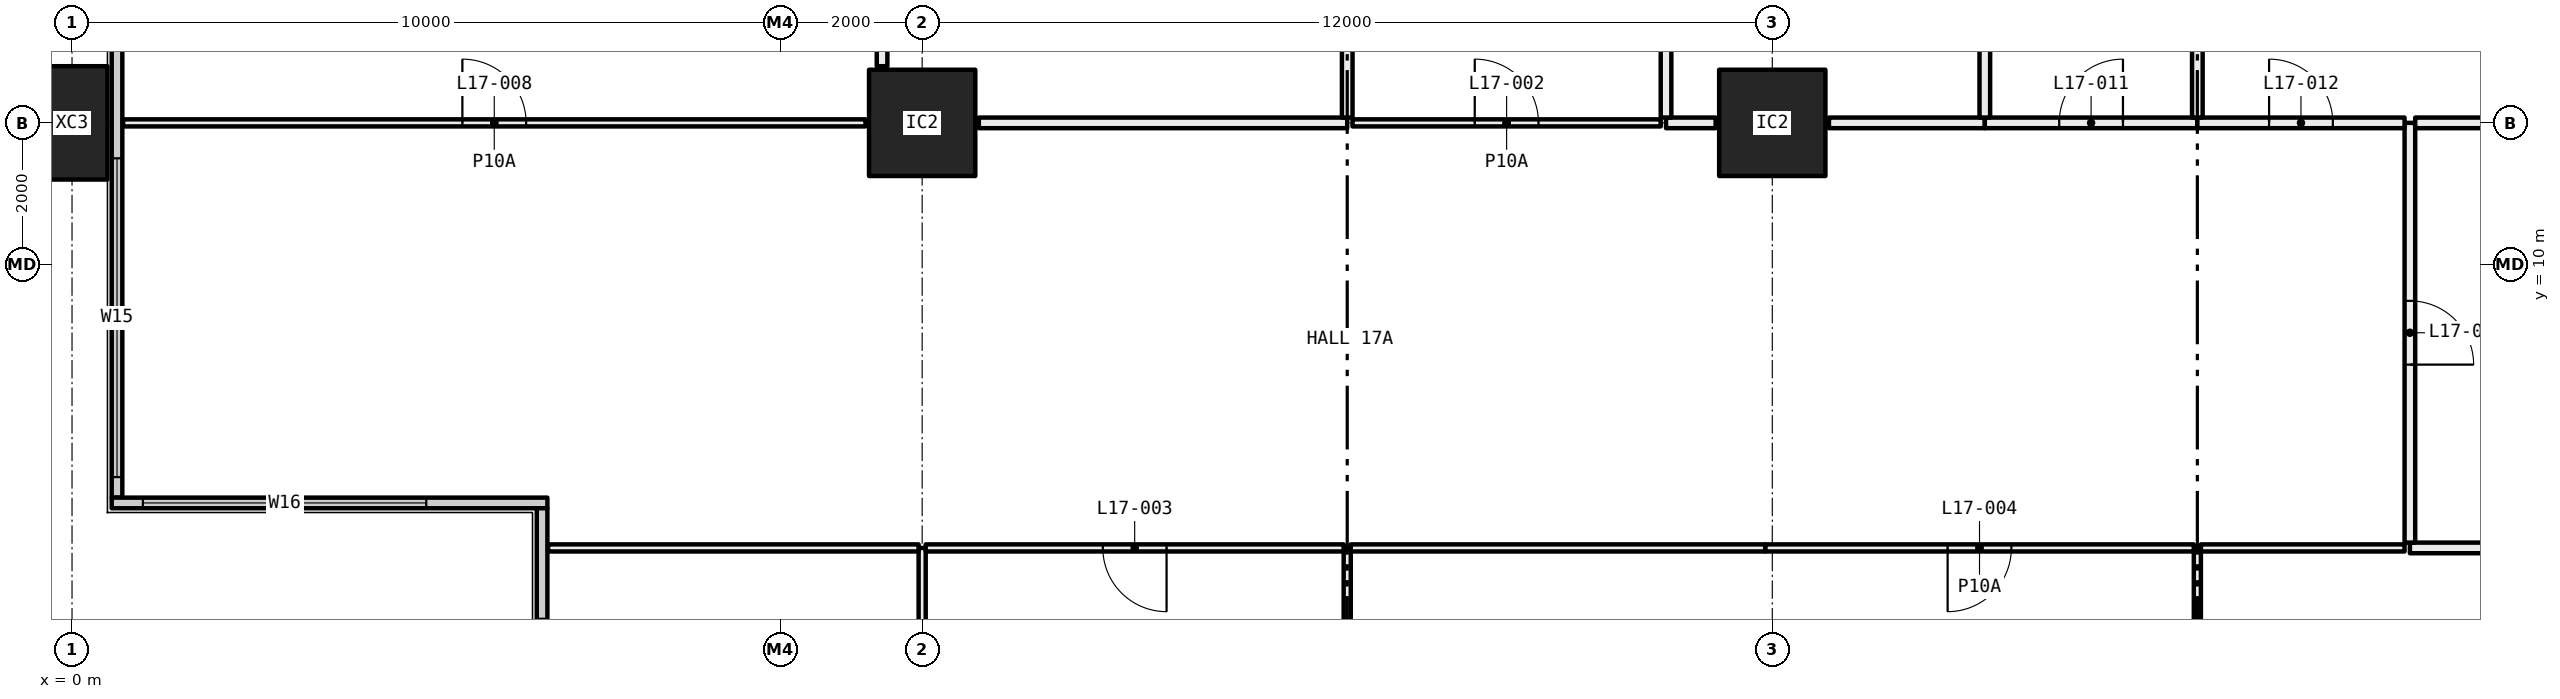
"""IFC4 building model, lengths in metres.
Left out: names, types, materials, properties, quantities, classifications, styles, units other than length and angle.
Written with IfcOpenShell. Run it as: python <this file> out.ifc"""

import sys

from ifc_helpers import new_model, si_unit, direction, frame, frame_2d, origin, origin_2d, place, context, subcontext, project, spatial, rectangle, hollow_rectangle, extrude, element, fill, save


model = new_model("IFC4")
c1 = context("Model", 3, precision=1e-05, world=origin(), true_north=direction((0.0, 1.0)))
c2 = subcontext(c1, "Body", "Model", "MODEL_VIEW")
j1 = project(units=[si_unit("LENGTHUNIT", "METRE"), si_unit("PLANEANGLEUNIT", "RADIAN")], contexts=[c1])
p1 = place(None, origin())
s1 = spatial("IfcSite", under=j1, at=p1, CompositionType="ELEMENT")
p2 = place(p1, origin())
s2 = spatial("IfcBuilding", under=s1, at=p2, CompositionType="ELEMENT")
p3 = place(p2, frame((0.0, 0.0, 71.4)))
s3 = spatial("IfcBuildingStorey", under=s2, at=p3, CompositionType="ELEMENT", Elevation=71.4)
p4 = place(p3, frame((0.0, 12.0, -0.4), z_axis=(0.0, 0.0, 1.0), x_axis=(0.0, 1.0, 0.0)))
e1 = element("IfcColumn", 1, at=p4, inside=s3, PredefinedType="COLUMN", context=c2, shape_type="SweptSolid", body=[
    extrude(hollow_rectangle(XDim=1.6, YDim=1.0, WallThickness=0.065, at=origin_2d()), origin(), (0.0, 0.0, 1.0), 3.45),
])
for number, where, z_axis, x_axis in (
    (2, (12.0, 12.0, 0.0), (0.0, 0.0, 1.0), (1.0, 0.0, 0.0)),
    (3, (24.0, 12.0, 0.0), (0.0, 0.0, 1.0), (1.0, 0.0, 0.0)),
):
    element("IfcColumn", number, at=place(p3, frame(where, z_axis=z_axis, x_axis=x_axis)), inside=s3, PredefinedType="COLUMN", context=c2, shape_type="SweptSolid", body=[
        extrude(hollow_rectangle(XDim=1.5, YDim=1.5, WallThickness=0.065, at=origin_2d()), origin(), (0.0, 0.0, 1.0), 3.05),
    ])
p5 = place(p3, frame((0.635, 6.71, 0.0), z_axis=(0.0, 0.0, 1.0), x_axis=(0.0, 1.0, 0.0)))
e4 = element("IfcWall", 4, at=p5, inside=s3, PredefinedType="ELEMENTEDWALL", context=c2, shape_type="SweptSolid", body=[
    extrude(rectangle(XDim=34.58, YDim=0.15, at=frame_2d((17.29, 0.0))), origin(), (0.0, 0.0, 1.0), 3.05),
])
p6 = place(p5, frame((0.29, 0.0, 0.45)))
e5 = element("IfcOpeningElement", 5, at=p6, cuts=e4, PredefinedType="OPENING", context=c2, shape_type="SweptSolid", body=[
    extrude(rectangle(XDim=4.5, YDim=2.55, at=frame_2d((2.25, 1.275))), frame((0.0, 0.085, 0.0), z_axis=(0.0, -1.0, 0.0), x_axis=(1.0, 0.0, 0.0)), (0.0, 0.0, 1.0), 0.17),
])
p7 = place(p5, frame((7.79, 0.0, 0.45)))
e6 = element("IfcOpeningElement", 6, at=p7, cuts=e4, PredefinedType="OPENING", context=c2, shape_type="SweptSolid", body=[
    extrude(rectangle(XDim=3.0, YDim=2.55, at=frame_2d((1.5, 1.275))), frame((0.0, 0.085, 0.0), z_axis=(0.0, -1.0, 0.0), x_axis=(1.0, 0.0, 0.0)), (0.0, 0.0, 1.0), 0.17),
])
p8 = place(p5, frame((11.79, 0.0, 0.45)))
e7 = element("IfcOpeningElement", 7, at=p8, cuts=e4, PredefinedType="OPENING", context=c2, shape_type="SweptSolid", body=[
    extrude(rectangle(XDim=3.0, YDim=2.55, at=frame_2d((1.5, 1.275))), frame((0.0, 0.085, 0.0), z_axis=(0.0, -1.0, 0.0), x_axis=(1.0, 0.0, 0.0)), (0.0, 0.0, 1.0), 0.17),
])
p9 = place(p5, frame((19.79, 0.0, 0.45)))
e8 = element("IfcOpeningElement", 8, at=p9, cuts=e4, PredefinedType="OPENING", context=c2, shape_type="SweptSolid", body=[
    extrude(rectangle(XDim=3.0, YDim=2.55, at=frame_2d((1.5, 1.275))), frame((0.0, 0.085, 0.0), z_axis=(0.0, -1.0, 0.0), x_axis=(1.0, 0.0, 0.0)), (0.0, 0.0, 1.0), 0.17),
])
p10 = place(p5, frame((23.79, 0.0, 0.45)))
e9 = element("IfcOpeningElement", 9, at=p10, cuts=e4, PredefinedType="OPENING", context=c2, shape_type="SweptSolid", body=[
    extrude(rectangle(XDim=2.0, YDim=2.55, at=frame_2d((1.0, 1.275))), frame((0.0, 0.085, 0.0), z_axis=(0.0, -1.0, 0.0), x_axis=(1.0, 0.0, 0.0)), (0.0, 0.0, 1.0), 0.17),
])
p11 = place(p5, frame((29.79, 0.0, 0.45)))
e10 = element("IfcOpeningElement", 10, at=p11, cuts=e4, PredefinedType="OPENING", context=c2, shape_type="SweptSolid", body=[
    extrude(rectangle(XDim=4.5, YDim=2.55, at=frame_2d((2.25, 1.275))), frame((0.0, 0.085, 0.0), z_axis=(0.0, -1.0, 0.0), x_axis=(1.0, 0.0, 0.0)), (0.0, 0.0, 1.0), 0.17),
])
p12 = place(p3, frame((0.56, 6.635, 0.0), z_axis=(0.0, 0.0, 1.0), x_axis=(1.0, 0.0, 0.0)))
e11 = element("IfcWall", 11, at=p12, inside=s3, PredefinedType="ELEMENTEDWALL", context=c2, shape_type="SweptSolid", body=[
    extrude(rectangle(XDim=6.15, YDim=0.15, at=frame_2d((3.075, 0.0))), origin(), (0.0, 0.0, 1.0), 3.05),
])
p13 = place(p12, frame((0.44, 0.0, 0.45)))
e12 = element("IfcOpeningElement", 12, at=p13, cuts=e11, PredefinedType="OPENING", context=c2, shape_type="SweptSolid", body=[
    extrude(rectangle(XDim=4.0, YDim=2.55, at=frame_2d((2.0, 1.275))), frame((0.0, 0.085, 0.0), z_axis=(0.0, -1.0, 0.0), x_axis=(1.0, 0.0, 0.0)), (0.0, 0.0, 1.0), 0.17),
])
p14 = place(p3, frame((6.635, 0.71, 0.0), z_axis=(0.0, 0.0, 1.0), x_axis=(0.0, 1.0, 0.0)))
e13 = element("IfcWall", 13, at=p14, inside=s3, PredefinedType="ELEMENTEDWALL", context=c2, shape_type="SweptSolid", body=[
    extrude(rectangle(XDim=5.85, YDim=0.15, at=frame_2d((2.925, 0.0))), origin(), (0.0, 0.0, 1.0), 3.05),
])
p15 = place(p14, frame((0.29, 0.0, 0.45)))
e14 = element("IfcOpeningElement", 14, at=p15, cuts=e13, PredefinedType="OPENING", context=c2, shape_type="SweptSolid", body=[
    extrude(rectangle(XDim=4.0, YDim=2.55, at=frame_2d((2.0, 1.275))), frame((0.0, 0.085, 0.0), z_axis=(0.0, -1.0, 0.0), x_axis=(1.0, 0.0, 0.0)), (0.0, 0.0, 1.0), 0.17),
])
p16 = place(p3, frame((12.0, 0.72, 0.0), z_axis=(0.0, 0.0, 1.0), x_axis=(0.0, 1.0, 0.0)))
e15 = element("IfcWall", 15, at=p16, inside=s3, PredefinedType="PARTITIONING", context=c2, shape_type="SweptSolid", body=[
    extrude(rectangle(XDim=5.28, YDim=0.1, at=frame_2d((2.64, 0.0))), origin(), (0.0, 0.0, 1.0), 2.45),
])
p17 = place(p16, frame((2.19, 0.0, 0.0)))
e16 = element("IfcOpeningElement", 16, at=p17, cuts=e15, PredefinedType="OPENING", context=c2, shape_type="SweptSolid", body=[
    extrude(rectangle(XDim=0.9, YDim=2.1, at=frame_2d((0.45, 1.05))), frame((0.0, 0.06, 0.0), z_axis=(0.0, -1.0, 0.0), x_axis=(1.0, 0.0, 0.0)), (0.0, 0.0, 1.0), 0.12),
])
p18 = place(p3, frame((11.95, 6.0, 0.0), z_axis=(0.0, 0.0, 1.0), x_axis=(-1.0, 0.0, 0.0)))
e17 = element("IfcWall", 17, at=p18, inside=s3, PredefinedType="PARTITIONING", context=c2, shape_type="SweptSolid", body=[
    extrude(rectangle(XDim=5.23, YDim=0.1, at=frame_2d((2.615, 0.0))), origin(), (0.0, 0.0, 1.0), 2.45),
])
p19 = place(p3, frame((18.0, 0.72, 0.0), z_axis=(0.0, 0.0, 1.0), x_axis=(0.0, 1.0, 0.0)))
e18 = element("IfcWall", 18, at=p19, inside=s3, PredefinedType="PARTITIONING", context=c2, shape_type="SweptSolid", body=[
    extrude(rectangle(XDim=5.28, YDim=0.1, at=frame_2d((2.64, 0.0))), origin(), (0.0, 0.0, 1.0), 3.05),
])
p20 = place(p3, frame((17.95, 6.0, 0.0), z_axis=(0.0, 0.0, 1.0), x_axis=(-1.0, 0.0, 0.0)))
e19 = element("IfcWall", 19, at=p20, inside=s3, PredefinedType="PARTITIONING", context=c2, shape_type="SweptSolid", body=[
    extrude(rectangle(XDim=5.9, YDim=0.1, at=frame_2d((2.95, 0.0))), origin(), (0.0, 0.0, 1.0), 2.45),
])
p21 = place(p20, frame((2.5, 0.0, 0.0)))
e20 = element("IfcOpeningElement", 20, at=p21, cuts=e19, PredefinedType="OPENING", context=c2, shape_type="SweptSolid", body=[
    extrude(rectangle(XDim=0.9, YDim=2.1, at=frame_2d((0.45, 1.05))), frame((0.0, 0.06, 0.0), z_axis=(0.0, -1.0, 0.0), x_axis=(1.0, 0.0, 0.0)), (0.0, 0.0, 1.0), 0.12),
])
p22 = place(p3, frame((30.0, 0.72, 0.0), z_axis=(0.0, 0.0, 1.0), x_axis=(0.0, 1.0, 0.0)))
e21 = element("IfcWall", 21, at=p22, inside=s3, PredefinedType="PARTITIONING", context=c2, shape_type="SweptSolid", body=[
    extrude(rectangle(XDim=5.28, YDim=0.1, at=frame_2d((2.64, 0.0))), origin(), (0.0, 0.0, 1.0), 3.05),
])
p23 = place(p22, frame((2.19, 0.0, 0.0)))
e22 = element("IfcOpeningElement", 22, at=p23, cuts=e21, PredefinedType="OPENING", context=c2, shape_type="SweptSolid", body=[
    extrude(rectangle(XDim=0.9, YDim=2.1, at=frame_2d((0.45, 1.05))), frame((0.0, 0.06, 0.0), z_axis=(0.0, -1.0, 0.0), x_axis=(1.0, 0.0, 0.0)), (0.0, 0.0, 1.0), 0.12),
])
p24 = place(p3, frame((29.95, 6.0, 0.0), z_axis=(0.0, 0.0, 1.0), x_axis=(-1.0, 0.0, 0.0)))
e23 = element("IfcWall", 23, at=p24, inside=s3, PredefinedType="PARTITIONING", context=c2, shape_type="SweptSolid", body=[
    extrude(rectangle(XDim=6.05, YDim=0.1, at=frame_2d((3.025, 0.0))), origin(), (0.0, 0.0, 1.0), 2.45),
])
p25 = place(p24, frame((2.575, 0.0, 0.0)))
e24 = element("IfcOpeningElement", 24, at=p25, cuts=e23, PredefinedType="OPENING", context=c2, shape_type="SweptSolid", body=[
    extrude(rectangle(XDim=0.9, YDim=2.1, at=frame_2d((0.45, 1.05))), frame((0.0, 0.06, 0.0), z_axis=(0.0, -1.0, 0.0), x_axis=(1.0, 0.0, 0.0)), (0.0, 0.0, 1.0), 0.12),
])
p26 = place(p3, frame((23.9, 6.0, 0.0), z_axis=(0.0, 0.0, 1.0), x_axis=(-1.0, 0.0, 0.0)))
e25 = element("IfcWall", 25, at=p26, inside=s3, PredefinedType="PARTITIONING", context=c2, shape_type="SweptSolid", body=[
    extrude(rectangle(XDim=5.85, YDim=0.1, at=frame_2d((2.925, 0.0))), origin(), (0.0, 0.0, 1.0), 3.05),
])
p27 = place(p3, frame((32.925, 6.0, 0.0), z_axis=(0.0, 0.0, 1.0), x_axis=(-1.0, 0.0, 0.0)))
e26 = element("IfcWall", 26, at=p27, inside=s3, PredefinedType="PARTITIONING", context=c2, shape_type="SweptSolid", body=[
    extrude(rectangle(XDim=2.875, YDim=0.1, at=frame_2d((1.438, 0.0))), origin(), (0.0, 0.0, 1.0), 3.05),
])
p28 = place(p3, frame((35.9, 6.0, 0.0), z_axis=(0.0, 0.0, 1.0), x_axis=(-1.0, 0.0, 0.0)))
e27 = element("IfcWall", 27, at=p28, inside=s3, PredefinedType="PARTITIONING", context=c2, shape_type="SweptSolid", body=[
    extrude(rectangle(XDim=2.9, YDim=0.15, at=frame_2d((1.45, 0.0))), origin(), (0.0, 0.0, 1.0), 3.05),
])
p29 = place(p3, frame((33.0, 6.075, 0.0), z_axis=(0.0, 0.0, 1.0), x_axis=(0.0, 1.0, 0.0)))
e28 = element("IfcWall", 28, at=p29, inside=s3, PredefinedType="PARTITIONING", context=c2, shape_type="SweptSolid", body=[
    extrude(rectangle(XDim=5.925, YDim=0.15, at=frame_2d((2.962, 0.0))), origin(), (0.0, 0.0, 1.0), 2.45),
])
p30 = place(p29, frame((2.512, 0.0, 0.0)))
e29 = element("IfcOpeningElement", 29, at=p30, cuts=e28, PredefinedType="OPENING", context=c2, shape_type="SweptSolid", body=[
    extrude(rectangle(XDim=0.9, YDim=2.1, at=frame_2d((0.45, 1.05))), frame((0.0, 0.085, 0.0), z_axis=(0.0, -1.0, 0.0), x_axis=(1.0, 0.0, 0.0)), (0.0, 0.0, 1.0), 0.17),
])
p31 = place(p3, frame((11.2, 12.0, 0.0), z_axis=(0.0, 0.0, 1.0), x_axis=(-1.0, 0.0, 0.0)))
e30 = element("IfcWall", 30, at=p31, inside=s3, PredefinedType="PARTITIONING", context=c2, shape_type="SweptSolid", body=[
    extrude(rectangle(XDim=10.48, YDim=0.1, at=frame_2d((5.24, 0.0))), origin(), (0.0, 0.0, 1.0), 2.45),
])
p32 = place(p31, frame((4.79, 0.0, 0.0)))
e31 = element("IfcOpeningElement", 31, at=p32, cuts=e30, PredefinedType="OPENING", context=c2, shape_type="SweptSolid", body=[
    extrude(rectangle(XDim=0.9, YDim=2.1, at=frame_2d((0.45, 1.05))), frame((0.0, 0.06, 0.0), z_axis=(0.0, -1.0, 0.0), x_axis=(1.0, 0.0, 0.0)), (0.0, 0.0, 1.0), 0.12),
])
p33 = place(p3, frame((18.0, 12.0, 0.0), z_axis=(0.0, 0.0, 1.0), x_axis=(-1.0, 0.0, 0.0)))
e32 = element("IfcWall", 32, at=p33, inside=s3, PredefinedType="PARTITIONING", context=c2, shape_type="SweptSolid", body=[
    extrude(rectangle(XDim=5.2, YDim=0.15, at=frame_2d((2.6, 0.0))), origin(), (0.0, 0.0, 1.0), 2.45),
])
p34 = place(p3, frame((22.425, 12.0, 0.0), z_axis=(0.0, 0.0, 1.0), x_axis=(-1.0, 0.0, 0.0)))
e33 = element("IfcWall", 33, at=p34, inside=s3, PredefinedType="PARTITIONING", context=c2, shape_type="SweptSolid", body=[
    extrude(rectangle(XDim=4.35, YDim=0.1, at=frame_2d((2.175, 0.0))), origin(), (0.0, 0.0, 1.0), 2.45),
])
p35 = place(p34, frame((1.725, 0.0, 0.0)))
e34 = element("IfcOpeningElement", 34, at=p35, cuts=e33, PredefinedType="OPENING", context=c2, shape_type="SweptSolid", body=[
    extrude(rectangle(XDim=0.9, YDim=2.1, at=frame_2d((0.45, 1.05))), frame((0.0, 0.06, 0.0), z_axis=(0.0, -1.0, 0.0), x_axis=(1.0, 0.0, 0.0)), (0.0, 0.0, 1.0), 0.12),
])
p36 = place(p3, frame((23.2, 12.0, 0.0), z_axis=(0.0, 0.0, 1.0), x_axis=(-1.0, 0.0, 0.0)))
e35 = element("IfcWall", 35, at=p36, inside=s3, PredefinedType="PARTITIONING", context=c2, shape_type="SweptSolid", body=[
    extrude(rectangle(XDim=0.7, YDim=0.15, at=frame_2d((0.35, 0.0))), origin(), (0.0, 0.0, 1.0), 2.45),
])
p37 = place(p3, frame((27.0, 12.0, 0.0), z_axis=(0.0, 0.0, 1.0), x_axis=(-1.0, 0.0, 0.0)))
e36 = element("IfcWall", 36, at=p37, inside=s3, PredefinedType="PARTITIONING", context=c2, shape_type="SweptSolid", body=[
    extrude(rectangle(XDim=2.2, YDim=0.15, at=frame_2d((1.1, 0.0))), origin(), (0.0, 0.0, 1.0), 2.45),
])
p38 = place(p3, frame((30.0, 12.0, 0.0), z_axis=(0.0, 0.0, 1.0), x_axis=(-1.0, 0.0, 0.0)))
e37 = element("IfcWall", 37, at=p38, inside=s3, PredefinedType="PARTITIONING", context=c2, shape_type="SweptSolid", body=[
    extrude(rectangle(XDim=3.0, YDim=0.15, at=frame_2d((1.5, 0.0))), origin(), (0.0, 0.0, 1.0), 2.45),
])
p39 = place(p38, frame((1.05, 0.0, 0.0)))
e38 = element("IfcOpeningElement", 38, at=p39, cuts=e37, PredefinedType="OPENING", context=c2, shape_type="SweptSolid", body=[
    extrude(rectangle(XDim=0.9, YDim=2.1, at=frame_2d((0.45, 1.05))), frame((0.0, 0.085, 0.0), z_axis=(0.0, -1.0, 0.0), x_axis=(1.0, 0.0, 0.0)), (0.0, 0.0, 1.0), 0.17),
])
p40 = place(p3, frame((32.925, 12.0, 0.0), z_axis=(0.0, 0.0, 1.0), x_axis=(-1.0, 0.0, 0.0)))
e39 = element("IfcWall", 39, at=p40, inside=s3, PredefinedType="PARTITIONING", context=c2, shape_type="SweptSolid", body=[
    extrude(rectangle(XDim=2.925, YDim=0.15, at=frame_2d((1.462, 0.0))), origin(), (0.0, 0.0, 1.0), 2.45),
])
p41 = place(p40, frame((1.012, 0.0, 0.0)))
e40 = element("IfcOpeningElement", 40, at=p41, cuts=e39, PredefinedType="OPENING", context=c2, shape_type="SweptSolid", body=[
    extrude(rectangle(XDim=0.9, YDim=2.1, at=frame_2d((0.45, 1.05))), frame((0.0, 0.085, 0.0), z_axis=(0.0, -1.0, 0.0), x_axis=(1.0, 0.0, 0.0)), (0.0, 0.0, 1.0), 0.17),
])
p42 = place(p3, frame((35.2, 12.0, 0.0), z_axis=(0.0, 0.0, 1.0), x_axis=(-1.0, 0.0, 0.0)))
e41 = element("IfcWall", 41, at=p42, inside=s3, PredefinedType="PARTITIONING", context=c2, shape_type="SweptSolid", body=[
    extrude(rectangle(XDim=2.125, YDim=0.15, at=frame_2d((1.062, 0.0))), origin(), (0.0, 0.0, 1.0), 2.45),
])
p43 = place(p3, frame((11.434, 12.8, 0.0), z_axis=(0.0, 0.0, 1.0), x_axis=(0.0, 1.0, 0.0)))
e42 = element("IfcWall", 42, at=p43, inside=s3, PredefinedType="PARTITIONING", context=c2, shape_type="SweptSolid", body=[
    extrude(rectangle(XDim=5.1, YDim=0.15, at=frame_2d((2.55, 0.0))), origin(), (0.0, 0.0, 1.0), 3.05),
])
p44 = place(p3, frame((18.0, 12.075, 0.0), z_axis=(0.0, 0.0, 1.0), x_axis=(0.0, 1.0, 0.0)))
e43 = element("IfcWall", 43, at=p44, inside=s3, PredefinedType="PARTITIONING", context=c2, shape_type="SweptSolid", body=[
    extrude(rectangle(XDim=5.825, YDim=0.15, at=frame_2d((2.913, 0.0))), origin(), (0.0, 0.0, 1.0), 2.45),
])
p45 = place(p44, frame((2.462, 0.0, 0.0)))
e44 = element("IfcOpeningElement", 44, at=p45, cuts=e43, PredefinedType="OPENING", context=c2, shape_type="SweptSolid", body=[
    extrude(rectangle(XDim=0.9, YDim=2.1, at=frame_2d((0.45, 1.05))), frame((0.0, 0.085, 0.0), z_axis=(0.0, -1.0, 0.0), x_axis=(1.0, 0.0, 0.0)), (0.0, 0.0, 1.0), 0.17),
])
p46 = place(p3, frame((22.5, 12.075, 0.0), z_axis=(0.0, 0.0, 1.0), x_axis=(0.0, 1.0, 0.0)))
e45 = element("IfcWall", 45, at=p46, inside=s3, PredefinedType="PARTITIONING", context=c2, shape_type="SweptSolid", body=[
    extrude(rectangle(XDim=5.825, YDim=0.15, at=frame_2d((2.913, 0.0))), origin(), (0.0, 0.0, 1.0), 2.45),
])
p47 = place(p46, frame((2.462, 0.0, 0.0)))
e46 = element("IfcOpeningElement", 46, at=p47, cuts=e45, PredefinedType="OPENING", context=c2, shape_type="SweptSolid", body=[
    extrude(rectangle(XDim=0.9, YDim=2.1, at=frame_2d((0.45, 1.05))), frame((0.0, 0.085, 0.0), z_axis=(0.0, -1.0, 0.0), x_axis=(1.0, 0.0, 0.0)), (0.0, 0.0, 1.0), 0.17),
])
for number, where, z_axis, x_axis in (
    (47, (27.0, 12.075, 0.0), (0.0, 0.0, 1.0), (0.0, 1.0, 0.0)),
    (48, (30.0, 12.075, 0.0), (0.0, 0.0, 1.0), (0.0, 1.0, 0.0)),
):
    element("IfcWall", number, at=place(p3, frame(where, z_axis=z_axis, x_axis=x_axis)), inside=s3, PredefinedType="PARTITIONING", context=c2, shape_type="SweptSolid", body=[
        extrude(rectangle(XDim=5.925, YDim=0.15, at=frame_2d((2.962, 0.0))), origin(), (0.0, 0.0, 1.0), 2.45),
    ])
p48 = place(p6, origin())
e49 = element("IfcWindow", 49, at=p48, inside=s3, PartitioningType="SINGLE_PANEL", PredefinedType="WINDOW", context=c2, shape_type="SweptSolid", body=[
    extrude(rectangle(XDim=4.5, YDim=2.55, at=frame_2d((2.25, 1.275))), frame((0.0, 0.03, 0.0), z_axis=(0.0, -1.0, 0.0), x_axis=(1.0, 0.0, 0.0)), (0.0, 0.0, 1.0), 0.06),
])
fill(e5, e49)
p49 = place(p13, origin())
e50 = element("IfcWindow", 50, at=p49, inside=s3, PartitioningType="SINGLE_PANEL", PredefinedType="WINDOW", context=c2, shape_type="SweptSolid", body=[
    extrude(rectangle(XDim=4.0, YDim=2.55, at=frame_2d((2.0, 1.275))), frame((0.0, 0.03, 0.0), z_axis=(0.0, -1.0, 0.0), x_axis=(1.0, 0.0, 0.0)), (0.0, 0.0, 1.0), 0.06),
])
fill(e12, e50)
p50 = place(p35, frame((0.9, 0.0, 0.0), x_axis=(-1.0, 0.0, 0.0)))
e51 = element("IfcDoor", 51, at=p50, inside=s3, OperationType="SINGLE_SWING_RIGHT", PredefinedType="DOOR", context=c2, shape_type="SweptSolid", body=[
    extrude(rectangle(XDim=0.9, YDim=2.1, at=frame_2d((0.45, 1.05))), frame((0.0, 0.025, 0.0), z_axis=(0.0, -1.0, 0.0), x_axis=(1.0, 0.0, 0.0)), (0.0, 0.0, 1.0), 0.05),
])
fill(e34, e51)
p51 = place(p21, origin())
e52 = element("IfcDoor", 52, at=p51, inside=s3, OperationType="SINGLE_SWING_RIGHT", PredefinedType="DOOR", context=c2, shape_type="SweptSolid", body=[
    extrude(rectangle(XDim=0.9, YDim=2.1, at=frame_2d((0.45, 1.05))), frame((0.0, 0.025, 0.0), z_axis=(0.0, -1.0, 0.0), x_axis=(1.0, 0.0, 0.0)), (0.0, 0.0, 1.0), 0.05),
])
fill(e20, e52)
p52 = place(p25, origin())
e53 = element("IfcDoor", 53, at=p52, inside=s3, OperationType="SINGLE_SWING_LEFT", PredefinedType="DOOR", context=c2, shape_type="SweptSolid", body=[
    extrude(rectangle(XDim=0.9, YDim=2.1, at=frame_2d((0.45, 1.05))), frame((0.0, 0.025, 0.0), z_axis=(0.0, -1.0, 0.0), x_axis=(1.0, 0.0, 0.0)), (0.0, 0.0, 1.0), 0.05),
])
fill(e24, e53)
p53 = place(p30, frame((0.9, 0.0, 0.0), x_axis=(-1.0, 0.0, 0.0)))
e54 = element("IfcDoor", 54, at=p53, inside=s3, OperationType="SINGLE_SWING_LEFT", PredefinedType="DOOR", context=c2, shape_type="SweptSolid", body=[
    extrude(rectangle(XDim=0.9, YDim=2.1, at=frame_2d((0.45, 1.05))), frame((0.0, 0.025, 0.0), z_axis=(0.0, -1.0, 0.0), x_axis=(1.0, 0.0, 0.0)), (0.0, 0.0, 1.0), 0.05),
])
fill(e29, e54)
p54 = place(p32, frame((0.9, 0.0, 0.0), x_axis=(-1.0, 0.0, 0.0)))
e55 = element("IfcDoor", 55, at=p54, inside=s3, OperationType="SINGLE_SWING_RIGHT", PredefinedType="DOOR", context=c2, shape_type="SweptSolid", body=[
    extrude(rectangle(XDim=0.9, YDim=2.1, at=frame_2d((0.45, 1.05))), frame((0.0, 0.025, 0.0), z_axis=(0.0, -1.0, 0.0), x_axis=(1.0, 0.0, 0.0)), (0.0, 0.0, 1.0), 0.05),
])
fill(e31, e55)
p55 = place(p39, frame((0.9, 0.0, 0.0), x_axis=(-1.0, 0.0, 0.0)))
e56 = element("IfcDoor", 56, at=p55, inside=s3, OperationType="SINGLE_SWING_LEFT", PredefinedType="DOOR", context=c2, shape_type="SweptSolid", body=[
    extrude(rectangle(XDim=0.9, YDim=2.1, at=frame_2d((0.45, 1.05))), frame((0.0, 0.025, 0.0), z_axis=(0.0, -1.0, 0.0), x_axis=(1.0, 0.0, 0.0)), (0.0, 0.0, 1.0), 0.05),
])
fill(e38, e56)
p56 = place(p41, frame((0.9, 0.0, 0.0), x_axis=(-1.0, 0.0, 0.0)))
e57 = element("IfcDoor", 57, at=p56, inside=s3, OperationType="SINGLE_SWING_RIGHT", PredefinedType="DOOR", context=c2, shape_type="SweptSolid", body=[
    extrude(rectangle(XDim=0.9, YDim=2.1, at=frame_2d((0.45, 1.05))), frame((0.0, 0.025, 0.0), z_axis=(0.0, -1.0, 0.0), x_axis=(1.0, 0.0, 0.0)), (0.0, 0.0, 1.0), 0.05),
])
fill(e40, e57)
save(model, sys.argv[1])
